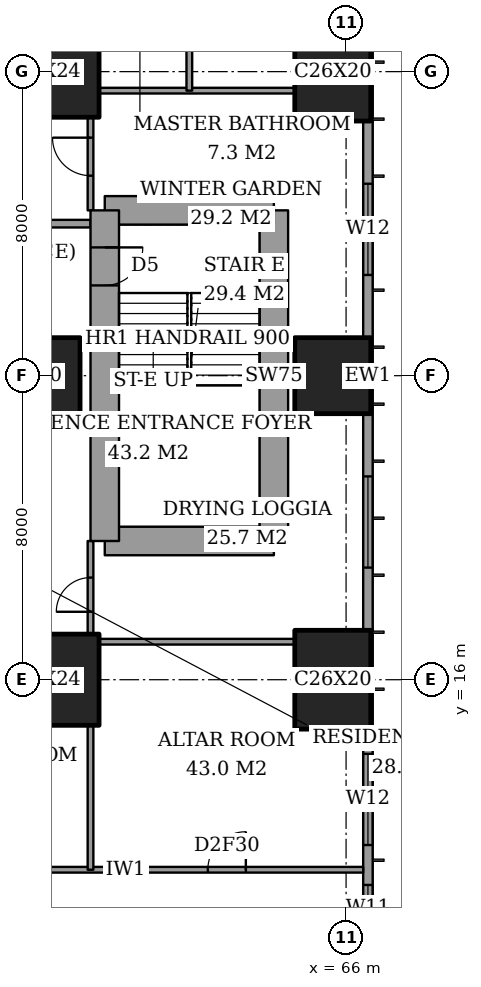
"""IFC4 building model, lengths in metres.
Left out: names, types, materials, properties, quantities, classifications, styles, units other than length and angle.
Written with IfcOpenShell. Run it as: python <this file> out.ifc"""

import sys

from ifc_helpers import new_model, si_unit, direction, frame, frame_2d, origin, origin_2d, place, context, subcontext, project, spatial, rectangle, extrude, element, fill, save


model = new_model("IFC4")
c1 = context("Model", 3, precision=1e-05, world=origin(), true_north=direction((0.0, 1.0)))
c2 = subcontext(c1, "Body", "Model", "MODEL_VIEW")
j1 = project(units=[si_unit("LENGTHUNIT", "METRE"), si_unit("PLANEANGLEUNIT", "RADIAN")], contexts=[c1])
p1 = place(None, origin())
s1 = spatial("IfcSite", under=j1, at=p1, CompositionType="ELEMENT")
p2 = place(p1, origin())
s2 = spatial("IfcBuilding", under=s1, at=p2, CompositionType="ELEMENT")
p3 = place(p2, frame((0.0, 0.0, 168.2)))
s3 = spatial("IfcBuildingStorey", under=s2, at=p3, CompositionType="ELEMENT", Elevation=168.2)
p4 = place(p3, frame((58.0, 16.0, 0.0), z_axis=(0.0, 0.0, 1.0), x_axis=(1.0, 0.0, 0.0)))
e1 = element("IfcColumn", 1, at=p4, inside=s3, PredefinedType="COLUMN", context=c2, shape_type="SweptSolid", body=[
    extrude(rectangle(XDim=3.0, YDim=2.4, at=origin_2d()), origin(), (0.0, 0.0, 1.0), 3.6),
])
p5 = place(p3, frame((58.0, 24.0, 0.0), z_axis=(0.0, 0.0, 1.0), x_axis=(1.0, 0.0, 0.0)))
e2 = element("IfcColumn", 2, at=p5, inside=s3, PredefinedType="COLUMN", context=c2, shape_type="SweptSolid", body=[
    extrude(rectangle(XDim=2.0, YDim=2.0, at=origin_2d()), origin(), (0.0, 0.0, 1.0), 3.6),
])
p6 = place(p3, frame((58.0, 32.0, 0.0), z_axis=(0.0, 0.0, 1.0), x_axis=(1.0, 0.0, 0.0)))
e3 = element("IfcColumn", 3, at=p6, inside=s3, PredefinedType="COLUMN", context=c2, shape_type="SweptSolid", body=[
    extrude(rectangle(XDim=3.0, YDim=2.4, at=origin_2d()), origin(), (0.0, 0.0, 1.0), 3.6),
])
p7 = place(p3, frame((65.65, 16.0, 0.0), z_axis=(0.0, 0.0, 1.0), x_axis=(0.0, 1.0, 0.0)))
e4 = element("IfcColumn", 4, at=p7, inside=s3, PredefinedType="COLUMN", context=c2, shape_type="SweptSolid", body=[
    extrude(rectangle(XDim=2.6, YDim=2.0, at=origin_2d()), origin(), (0.0, 0.0, 1.0), 3.6),
])
p8 = place(p3, frame((65.65, 24.0, 0.0), z_axis=(0.0, 0.0, 1.0), x_axis=(1.0, 0.0, 0.0)))
e5 = element("IfcColumn", 5, at=p8, inside=s3, PredefinedType="COLUMN", context=c2, shape_type="SweptSolid", body=[
    extrude(rectangle(XDim=2.0, YDim=2.0, at=origin_2d()), origin(), (0.0, 0.0, 1.0), 3.6),
])
p9 = place(p3, frame((65.65, 32.0, 0.0), z_axis=(0.0, 0.0, 1.0), x_axis=(0.0, 1.0, 0.0)))
e6 = element("IfcColumn", 6, at=p9, inside=s3, PredefinedType="COLUMN", context=c2, shape_type="SweptSolid", body=[
    extrude(rectangle(XDim=2.6, YDim=2.0, at=origin_2d()), origin(), (0.0, 0.0, 1.0), 3.6),
])
p10 = place(p3, frame((59.65, 19.65, 0.0), z_axis=(0.0, 0.0, 1.0), x_axis=(1.0, 0.0, 0.0)))
e7 = element("IfcWall", 7, at=p10, inside=s3, PredefinedType="SHEAR", context=c2, shape_type="SweptSolid", body=[
    extrude(rectangle(XDim=4.45, YDim=0.75, at=frame_2d((2.225, 0.0))), origin(), (0.0, 0.0, 1.0), 3.6),
])
p11 = place(p3, frame((64.1, 19.65, 0.0), z_axis=(0.0, 0.0, 1.0), x_axis=(0.0, 1.0, 0.0)))
e8 = element("IfcWall", 8, at=p11, inside=s3, PredefinedType="SHEAR", context=c2, shape_type="SweptSolid", body=[
    extrude(rectangle(XDim=8.7, YDim=0.75, at=frame_2d((4.35, 0.0))), origin(), (0.0, 0.0, 1.0), 3.6),
])
p12 = place(p3, frame((64.1, 28.35, 0.0), z_axis=(0.0, 0.0, 1.0), x_axis=(-1.0, 0.0, 0.0)))
e9 = element("IfcWall", 9, at=p12, inside=s3, PredefinedType="SHEAR", context=c2, shape_type="SweptSolid", body=[
    extrude(rectangle(XDim=4.45, YDim=0.75, at=frame_2d((2.225, 0.0))), origin(), (0.0, 0.0, 1.0), 3.6),
])
p13 = place(p3, frame((59.65, 28.35, 0.0), z_axis=(0.0, 0.0, 1.0), x_axis=(0.0, -1.0, 0.0)))
e10 = element("IfcWall", 10, at=p13, inside=s3, PredefinedType="SHEAR", context=c2, shape_type="SweptSolid", body=[
    extrude(rectangle(XDim=8.7, YDim=0.75, at=frame_2d((4.35, 0.0))), origin(), (0.0, 0.0, 1.0), 3.6),
])
p14 = place(p13, frame((0.975, 0.0, 0.0)))
e11 = element("IfcOpeningElement", 11, at=p14, cuts=e10, PredefinedType="OPENING", context=c2, shape_type="SweptSolid", body=[
    extrude(rectangle(XDim=1.0, YDim=2.1, at=frame_2d((0.5, 1.05))), frame((0.0, 0.385, 0.0), z_axis=(0.0, -1.0, 0.0), x_axis=(1.0, 0.0, 0.0)), (0.0, 0.0, 1.0), 0.77),
])
p15 = place(p3, frame((66.575, 3.175, 0.0), z_axis=(0.0, 0.0, 1.0), x_axis=(0.0, 1.0, 0.0)))
e12 = element("IfcWall", 12, at=p15, inside=s3, PredefinedType="SOLIDWALL", context=c2, shape_type="SweptSolid", body=[
    extrude(rectangle(XDim=41.65, YDim=0.25, at=frame_2d((20.825, 0.0))), origin(), (0.0, 0.0, 1.0), 3.6),
])
p16 = place(p15, frame((0.775, 0.0, 0.4)))
e13 = element("IfcOpeningElement", 13, at=p16, cuts=e12, PredefinedType="OPENING", context=c2, shape_type="SweptSolid", body=[
    extrude(rectangle(XDim=2.4, YDim=2.2, at=frame_2d((1.2, 1.1))), frame((0.0, 0.135, 0.0), z_axis=(0.0, -1.0, 0.0), x_axis=(1.0, 0.0, 0.0)), (0.0, 0.0, 1.0), 0.27),
])
p17 = place(p15, frame((6.225, 0.0, 0.4)))
e14 = element("IfcOpeningElement", 14, at=p17, cuts=e12, PredefinedType="OPENING", context=c2, shape_type="SweptSolid", body=[
    extrude(rectangle(XDim=1.2, YDim=2.2, at=frame_2d((0.6, 1.1))), frame((0.0, 0.135, 0.0), z_axis=(0.0, -1.0, 0.0), x_axis=(1.0, 0.0, 0.0)), (0.0, 0.0, 1.0), 0.27),
])
p18 = place(p15, frame((8.475, 0.0, 0.4)))
e15 = element("IfcOpeningElement", 15, at=p18, cuts=e12, PredefinedType="OPENING", context=c2, shape_type="SweptSolid", body=[
    extrude(rectangle(XDim=2.4, YDim=2.2, at=frame_2d((1.2, 1.1))), frame((0.0, 0.135, 0.0), z_axis=(0.0, -1.0, 0.0), x_axis=(1.0, 0.0, 0.0)), (0.0, 0.0, 1.0), 0.27),
])
p19 = place(p15, frame((15.775, 0.0, 0.4)))
e16 = element("IfcOpeningElement", 16, at=p19, cuts=e12, PredefinedType="OPENING", context=c2, shape_type="SweptSolid", body=[
    extrude(rectangle(XDim=2.4, YDim=2.2, at=frame_2d((1.2, 1.1))), frame((0.0, 0.135, 0.0), z_axis=(0.0, -1.0, 0.0), x_axis=(1.0, 0.0, 0.0)), (0.0, 0.0, 1.0), 0.27),
])
p20 = place(p15, frame((23.475, 0.0, 0.4)))
e17 = element("IfcOpeningElement", 17, at=p20, cuts=e12, PredefinedType="OPENING", context=c2, shape_type="SweptSolid", body=[
    extrude(rectangle(XDim=2.4, YDim=2.2, at=frame_2d((1.2, 1.1))), frame((0.0, 0.135, 0.0), z_axis=(0.0, -1.0, 0.0), x_axis=(1.0, 0.0, 0.0)), (0.0, 0.0, 1.0), 0.27),
])
p21 = place(p15, frame((30.975, 0.0, 0.4)))
e18 = element("IfcOpeningElement", 18, at=p21, cuts=e12, PredefinedType="OPENING", context=c2, shape_type="SweptSolid", body=[
    extrude(rectangle(XDim=2.4, YDim=2.2, at=frame_2d((1.2, 1.1))), frame((0.0, 0.135, 0.0), z_axis=(0.0, -1.0, 0.0), x_axis=(1.0, 0.0, 0.0)), (0.0, 0.0, 1.0), 0.27),
])
p22 = place(p15, frame((34.5, 0.0, 0.4)))
e19 = element("IfcOpeningElement", 19, at=p22, cuts=e12, PredefinedType="OPENING", context=c2, shape_type="SweptSolid", body=[
    extrude(rectangle(XDim=1.2, YDim=2.2, at=frame_2d((0.6, 1.1))), frame((0.0, 0.135, 0.0), z_axis=(0.0, -1.0, 0.0), x_axis=(1.0, 0.0, 0.0)), (0.0, 0.0, 1.0), 0.27),
])
p23 = place(p15, frame((38.475, 0.0, 0.4)))
e20 = element("IfcOpeningElement", 20, at=p23, cuts=e12, PredefinedType="OPENING", context=c2, shape_type="SweptSolid", body=[
    extrude(rectangle(XDim=2.4, YDim=2.2, at=frame_2d((1.2, 1.1))), frame((0.0, 0.135, 0.0), z_axis=(0.0, -1.0, 0.0), x_axis=(1.0, 0.0, 0.0)), (0.0, 0.0, 1.0), 0.27),
])
p24 = place(p3, frame((41.439, 11.0, 0.0), z_axis=(0.0, 0.0, 1.0), x_axis=(1.0, 0.0, 0.0)))
e21 = element("IfcWall", 21, at=p24, inside=s3, PredefinedType="PARTITIONING", context=c2, shape_type="SweptSolid", body=[
    extrude(rectangle(XDim=25.011, YDim=0.15, at=frame_2d((12.505, 0.0))), origin(), (0.0, 0.0, 1.0), 3.25),
])
p25 = place(p24, frame((12.361, 0.0, 0.0)))
e22 = element("IfcOpeningElement", 22, at=p25, cuts=e21, PredefinedType="OPENING", context=c2, shape_type="SweptSolid", body=[
    extrude(rectangle(XDim=1.0, YDim=2.1, at=frame_2d((0.5, 1.05))), frame((0.0, 0.085, 0.0), z_axis=(0.0, -1.0, 0.0), x_axis=(1.0, 0.0, 0.0)), (0.0, 0.0, 1.0), 0.17),
])
p26 = place(p24, frame((20.924, 0.0, 0.0)))
e23 = element("IfcOpeningElement", 23, at=p26, cuts=e21, PredefinedType="OPENING", context=c2, shape_type="SweptSolid", body=[
    extrude(rectangle(XDim=1.0, YDim=2.1, at=frame_2d((0.5, 1.05))), frame((0.0, 0.085, 0.0), z_axis=(0.0, -1.0, 0.0), x_axis=(1.0, 0.0, 0.0)), (0.0, 0.0, 1.0), 0.17),
])
p27 = place(p24, frame((15.448, 0.0, 0.0)))
e24 = element("IfcOpeningElement", 24, at=p27, cuts=e21, PredefinedType="OPENING", context=c2, shape_type="SweptSolid", body=[
    extrude(rectangle(XDim=0.9, YDim=2.1, at=frame_2d((0.45, 1.05))), frame((0.0, 0.085, 0.0), z_axis=(0.0, -1.0, 0.0), x_axis=(1.0, 0.0, 0.0)), (0.0, 0.0, 1.0), 0.17),
])
p28 = place(p24, frame((9.961, 0.0, 0.0)))
e25 = element("IfcOpeningElement", 25, at=p28, cuts=e21, PredefinedType="OPENING", context=c2, shape_type="SweptSolid", body=[
    extrude(rectangle(XDim=1.0, YDim=2.1, at=frame_2d((0.5, 1.05))), frame((0.0, 0.085, 0.0), z_axis=(0.0, -1.0, 0.0), x_axis=(1.0, 0.0, 0.0)), (0.0, 0.0, 1.0), 0.17),
])
p29 = place(p24, frame((7.411, 0.0, 0.0)))
e26 = element("IfcOpeningElement", 26, at=p29, cuts=e21, PredefinedType="OPENING", context=c2, shape_type="SweptSolid", body=[
    extrude(rectangle(XDim=0.9, YDim=2.1, at=frame_2d((0.45, 1.05))), frame((0.0, 0.085, 0.0), z_axis=(0.0, -1.0, 0.0), x_axis=(1.0, 0.0, 0.0)), (0.0, 0.0, 1.0), 0.17),
])
p30 = place(p24, frame((2.836, 0.0, 0.0)))
e27 = element("IfcOpeningElement", 27, at=p30, cuts=e21, PredefinedType="OPENING", context=c2, shape_type="SweptSolid", body=[
    extrude(rectangle(XDim=1.0, YDim=2.1, at=frame_2d((0.5, 1.05))), frame((0.0, 0.085, 0.0), z_axis=(0.0, -1.0, 0.0), x_axis=(1.0, 0.0, 0.0)), (0.0, 0.0, 1.0), 0.17),
])
p31 = place(p3, frame((59.5, 17.0, 0.0), z_axis=(0.0, 0.0, 1.0), x_axis=(1.0, 0.0, 0.0)))
e28 = element("IfcWall", 28, at=p31, inside=s3, PredefinedType="PARTITIONING", context=c2, shape_type="SweptSolid", body=[
    extrude(rectangle(XDim=5.15, YDim=0.15, at=frame_2d((2.575, 0.0))), origin(), (0.0, 0.0, 1.0), 3.25),
])
p32 = place(p3, frame((42.0, 28.0, 0.0), z_axis=(0.0, 0.0, 1.0), x_axis=(1.0, 0.0, 0.0)))
e29 = element("IfcWall", 29, at=p32, inside=s3, PredefinedType="PARTITIONING", context=c2, shape_type="SweptSolid", body=[
    extrude(rectangle(XDim=17.275, YDim=0.2, at=frame_2d((8.637, 0.0))), origin(), (0.0, 0.0, 1.0), 3.25),
])
p33 = place(p32, frame((9.1, 0.0, 0.0)))
e30 = element("IfcOpeningElement", 30, at=p33, cuts=e29, PredefinedType="OPENING", context=c2, shape_type="SweptSolid", body=[
    extrude(rectangle(XDim=1.2, YDim=2.4, at=frame_2d((0.6, 1.2))), frame((0.0, 0.11, 0.0), z_axis=(0.0, -1.0, 0.0), x_axis=(1.0, 0.0, 0.0)), (0.0, 0.0, 1.0), 0.22),
])
p34 = place(p3, frame((59.5, 31.5, 0.0), z_axis=(0.0, 0.0, 1.0), x_axis=(1.0, 0.0, 0.0)))
e31 = element("IfcWall", 31, at=p34, inside=s3, PredefinedType="PARTITIONING", context=c2, shape_type="SweptSolid", body=[
    extrude(rectangle(XDim=5.15, YDim=0.15, at=frame_2d((2.575, 0.0))), origin(), (0.0, 0.0, 1.0), 3.25),
])
p35 = place(p3, frame((59.275, 11.0, 0.0), z_axis=(0.0, 0.0, 1.0), x_axis=(0.0, 1.0, 0.0)))
e32 = element("IfcWall", 32, at=p35, inside=s3, PredefinedType="PARTITIONING", context=c2, shape_type="SweptSolid", body=[
    extrude(rectangle(XDim=3.8, YDim=0.15, at=frame_2d((1.9, 0.0))), origin(), (0.0, 0.0, 1.0), 3.25),
])
p36 = place(p3, frame((59.275, 17.2, 0.0), z_axis=(0.0, 0.0, 1.0), x_axis=(0.0, 1.0, 0.0)))
e33 = element("IfcWall", 33, at=p36, inside=s3, PredefinedType="PARTITIONING", context=c2, shape_type="SweptSolid", body=[
    extrude(rectangle(XDim=2.45, YDim=0.15, at=frame_2d((1.225, 0.0))), origin(), (0.0, 0.0, 1.0), 3.25),
])
p37 = place(p36, frame((0.587, 0.0, 0.0)))
e34 = element("IfcOpeningElement", 34, at=p37, cuts=e33, PredefinedType="OPENING", context=c2, shape_type="SweptSolid", body=[
    extrude(rectangle(XDim=0.9, YDim=2.1, at=frame_2d((0.45, 1.05))), frame((0.0, 0.085, 0.0), z_axis=(0.0, -1.0, 0.0), x_axis=(1.0, 0.0, 0.0)), (0.0, 0.0, 1.0), 0.17),
])
p38 = place(p3, frame((59.275, 28.35, 0.0), z_axis=(0.0, 0.0, 1.0), x_axis=(0.0, 1.0, 0.0)))
e35 = element("IfcWall", 35, at=p38, inside=s3, PredefinedType="PARTITIONING", context=c2, shape_type="SweptSolid", body=[
    extrude(rectangle(XDim=2.45, YDim=0.15, at=frame_2d((1.225, 0.0))), origin(), (0.0, 0.0, 1.0), 3.25),
])
p39 = place(p38, frame((0.913, 0.0, 0.0)))
e36 = element("IfcOpeningElement", 36, at=p39, cuts=e35, PredefinedType="OPENING", context=c2, shape_type="SweptSolid", body=[
    extrude(rectangle(XDim=1.0, YDim=2.1, at=frame_2d((0.5, 1.05))), frame((0.0, 0.085, 0.0), z_axis=(0.0, -1.0, 0.0), x_axis=(1.0, 0.0, 0.0)), (0.0, 0.0, 1.0), 0.17),
])
p40 = place(p3, frame((61.875, 31.5, 0.0), z_axis=(0.0, 0.0, 1.0), x_axis=(0.0, 1.0, 0.0)))
e37 = element("IfcWall", 37, at=p40, inside=s3, PredefinedType="PARTITIONING", context=c2, shape_type="SweptSolid", body=[
    extrude(rectangle(XDim=2.8, YDim=0.15, at=frame_2d((1.4, 0.0))), origin(), (0.0, 0.0, 1.0), 3.25),
])
p41 = place(p40, frame((1.15, 0.0, 0.0)))
e38 = element("IfcOpeningElement", 38, at=p41, cuts=e37, PredefinedType="OPENING", context=c2, shape_type="SweptSolid", body=[
    extrude(rectangle(XDim=0.9, YDim=2.1, at=frame_2d((0.45, 1.05))), frame((0.0, 0.085, 0.0), z_axis=(0.0, -1.0, 0.0), x_axis=(1.0, 0.0, 0.0)), (0.0, 0.0, 1.0), 0.17),
])
p42 = place(p17, origin())
e39 = element("IfcWindow", 39, at=p42, inside=s3, PartitioningType="SINGLE_PANEL", PredefinedType="WINDOW", context=c2, shape_type="SweptSolid", body=[
    extrude(rectangle(XDim=1.2, YDim=2.2, at=frame_2d((0.6, 1.1))), frame((0.0, 0.03, 0.0), z_axis=(0.0, -1.0, 0.0), x_axis=(1.0, 0.0, 0.0)), (0.0, 0.0, 1.0), 0.06),
])
fill(e14, e39)
p43 = place(p18, origin())
e40 = element("IfcWindow", 40, at=p43, inside=s3, PartitioningType="SINGLE_PANEL", PredefinedType="WINDOW", context=c2, shape_type="SweptSolid", body=[
    extrude(rectangle(XDim=2.4, YDim=2.2, at=frame_2d((1.2, 1.1))), frame((0.0, 0.03, 0.0), z_axis=(0.0, -1.0, 0.0), x_axis=(1.0, 0.0, 0.0)), (0.0, 0.0, 1.0), 0.06),
])
fill(e15, e40)
p44 = place(p19, origin())
e41 = element("IfcWindow", 41, at=p44, inside=s3, PartitioningType="SINGLE_PANEL", PredefinedType="WINDOW", context=c2, shape_type="SweptSolid", body=[
    extrude(rectangle(XDim=2.4, YDim=2.2, at=frame_2d((1.2, 1.1))), frame((0.0, 0.03, 0.0), z_axis=(0.0, -1.0, 0.0), x_axis=(1.0, 0.0, 0.0)), (0.0, 0.0, 1.0), 0.06),
])
fill(e16, e41)
p45 = place(p20, origin())
e42 = element("IfcWindow", 42, at=p45, inside=s3, PartitioningType="SINGLE_PANEL", PredefinedType="WINDOW", context=c2, shape_type="SweptSolid", body=[
    extrude(rectangle(XDim=2.4, YDim=2.2, at=frame_2d((1.2, 1.1))), frame((0.0, 0.03, 0.0), z_axis=(0.0, -1.0, 0.0), x_axis=(1.0, 0.0, 0.0)), (0.0, 0.0, 1.0), 0.06),
])
fill(e17, e42)
p46 = place(p26, origin())
e43 = element("IfcDoor", 43, at=p46, inside=s3, OperationType="SINGLE_SWING_LEFT", PredefinedType="DOOR", context=c2, shape_type="SweptSolid", body=[
    extrude(rectangle(XDim=1.0, YDim=2.1, at=frame_2d((0.5, 1.05))), frame((0.0, 0.025, 0.0), z_axis=(0.0, -1.0, 0.0), x_axis=(1.0, 0.0, 0.0)), (0.0, 0.0, 1.0), 0.05),
])
fill(e23, e43)
p47 = place(p37, origin())
e44 = element("IfcDoor", 44, at=p47, inside=s3, OperationType="SINGLE_SWING_RIGHT", PredefinedType="DOOR", context=c2, shape_type="SweptSolid", body=[
    extrude(rectangle(XDim=0.9, YDim=2.1, at=frame_2d((0.45, 1.05))), frame((0.0, 0.025, 0.0), z_axis=(0.0, -1.0, 0.0), x_axis=(1.0, 0.0, 0.0)), (0.0, 0.0, 1.0), 0.05),
])
fill(e34, e44)
p48 = place(p39, origin())
e45 = element("IfcDoor", 45, at=p48, inside=s3, OperationType="SINGLE_SWING_LEFT", PredefinedType="DOOR", context=c2, shape_type="SweptSolid", body=[
    extrude(rectangle(XDim=1.0, YDim=2.1, at=frame_2d((0.5, 1.05))), frame((0.0, 0.025, 0.0), z_axis=(0.0, -1.0, 0.0), x_axis=(1.0, 0.0, 0.0)), (0.0, 0.0, 1.0), 0.05),
])
fill(e36, e45)
p49 = place(p14, origin())
e46 = element("IfcDoor", 46, at=p49, inside=s3, OperationType="SINGLE_SWING_RIGHT", PredefinedType="DOOR", context=c2, shape_type="SweptSolid", body=[
    extrude(rectangle(XDim=1.0, YDim=2.1, at=frame_2d((0.5, 1.05))), frame((0.0, 0.025, 0.0), z_axis=(0.0, -1.0, 0.0), x_axis=(1.0, 0.0, 0.0)), (0.0, 0.0, 1.0), 0.05),
])
fill(e11, e46)
save(model, sys.argv[1])
